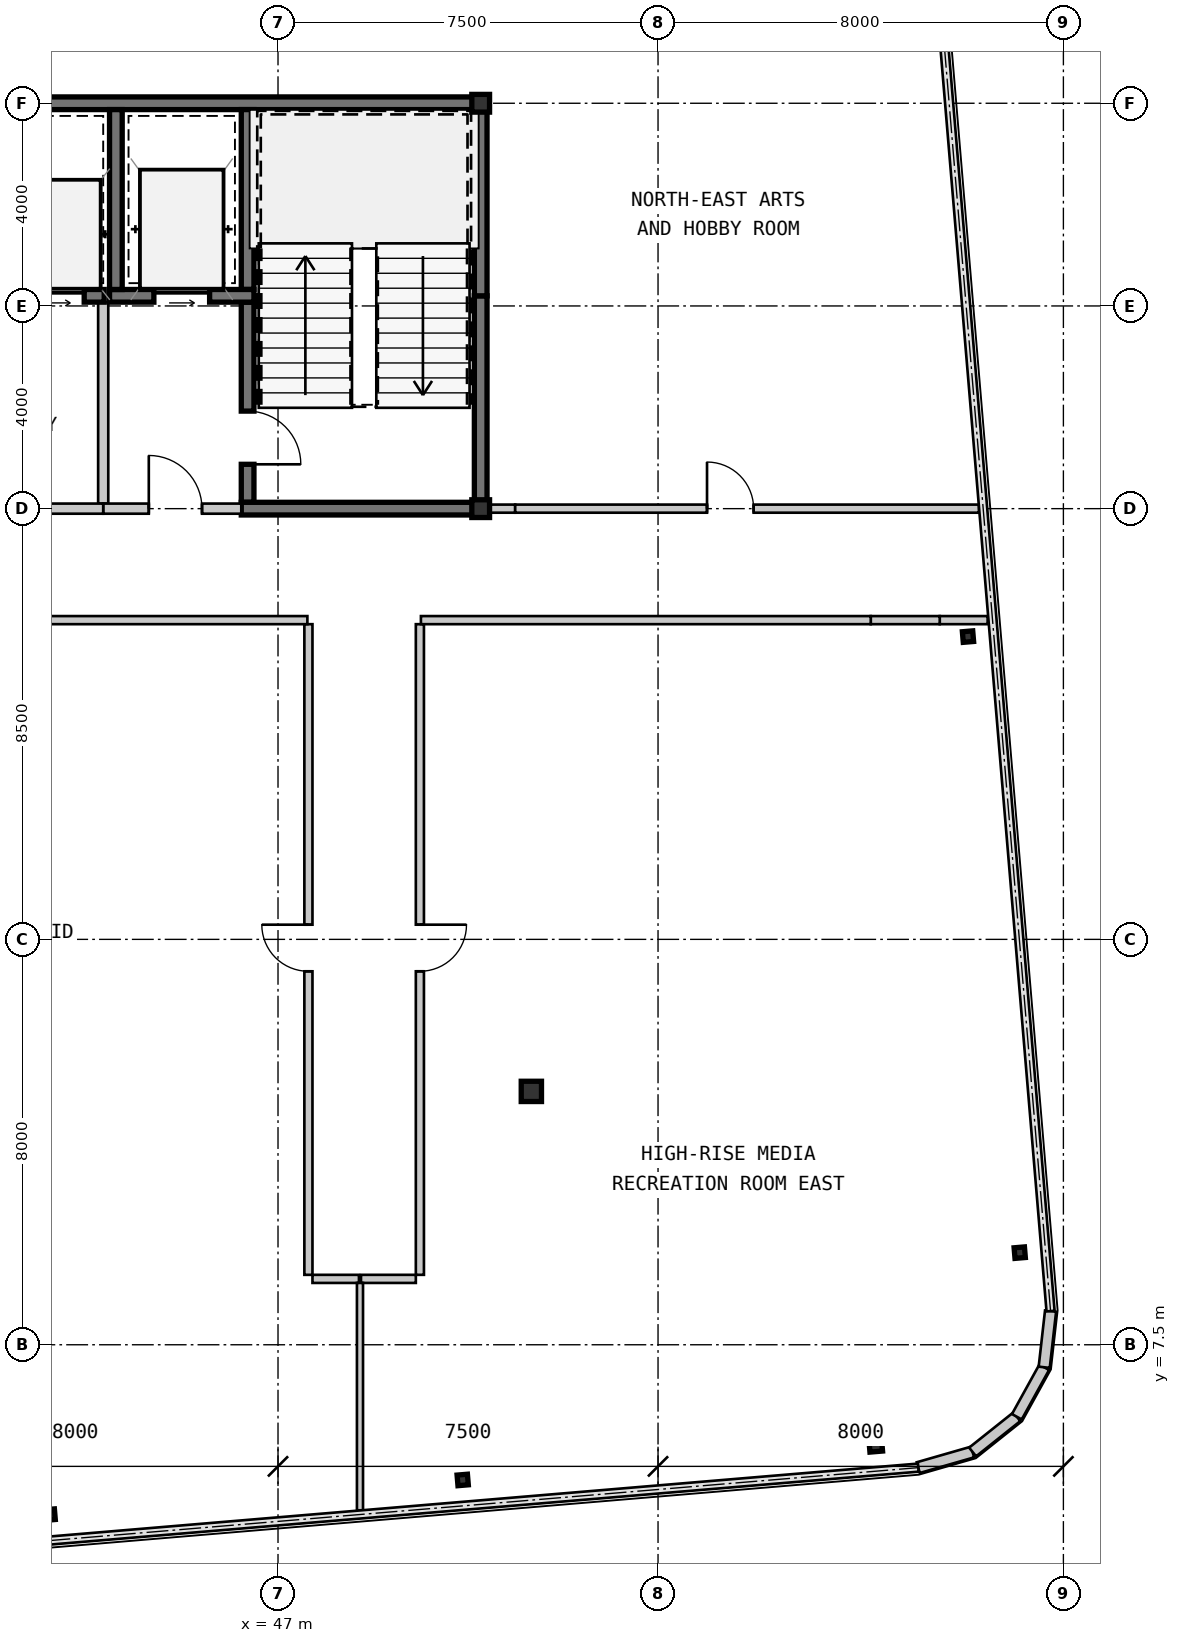
"""IFC4 building model, lengths in metres.
Left out: names, types, materials, properties, quantities, classifications, styles, units other than length and angle.
Written with IfcOpenShell. Run it as: python <this file> out.ifc"""

import sys

from ifc_helpers import new_model, si_unit, direction, frame, frame_2d, origin, origin_2d, place, context, subcontext, project, spatial, rectangle, hollow_rectangle, i_section, extrude, source, transform, mapped, element, fill, save


model = new_model("IFC4")
c1 = context("Model", 3, precision=1e-05, world=origin(), true_north=direction((0.0, 1.0)))
c2 = subcontext(c1, "Body", "Model", "MODEL_VIEW")
j1 = project(units=[si_unit("LENGTHUNIT", "METRE"), si_unit("PLANEANGLEUNIT", "RADIAN")], contexts=[c1])
p1 = place(None, origin())
s1 = spatial("IfcSite", under=j1, at=p1, CompositionType="ELEMENT")
p2 = place(p1, origin())
s2 = spatial("IfcBuilding", under=s1, at=p2, CompositionType="ELEMENT")
p3 = place(p2, frame((0.0, 0.0, 197.75)))
s3 = spatial("IfcBuildingStorey", under=s2, at=p3, CompositionType="ELEMENT", Elevation=197.75)
m1 = source(origin(), c2, "Body", "SweptSolid", [
    extrude(hollow_rectangle(XDim=0.35, YDim=0.35, WallThickness=0.016, at=origin_2d()), origin(), (0.0, 0.0, 1.0), 3.15),
])
for number, where, z_axis, x_axis in (
    (1, (51.0, 24.0, 0.0), (0.0, 0.0, 1.0), (1.0, 0.0, 0.0)),
    (2, (51.0, 32.0, 0.0), (0.0, 0.0, 1.0), (1.0, 0.0, 0.0)),
):
    element("IfcColumn", number, at=place(p3, frame(where, z_axis=z_axis, x_axis=x_axis)), inside=s3, PredefinedType="COLUMN", context=c2, shape_type="MappedRepresentation", body=[
        mapped(m1, transform((0.0, 0.0, 0.0), scale=1.0)),
    ])
m2 = source(origin(), c2, "Body", "SweptSolid", [
    extrude(hollow_rectangle(XDim=0.4, YDim=0.4, WallThickness=0.016, at=origin_2d()), origin(), (0.0, 0.0, 1.0), 3.15),
])
p4 = place(p3, frame((52.0, 12.5, 0.0), z_axis=(0.0, 0.0, 1.0), x_axis=(1.0, 0.0, 0.0)))
e3 = element("IfcColumn", 3, at=p4, inside=s3, PredefinedType="COLUMN", context=c2, shape_type="MappedRepresentation", body=[
    mapped(m2, transform((0.0, 0.0, 0.0), scale=1.0)),
])
m3 = source(origin(), c2, "Body", "SweptSolid", [
    extrude(i_section(OverallWidth=0.205, OverallDepth=0.21, WebThickness=0.009, FlangeThickness=0.014, at=origin_2d()), origin(), (0.0, 0.0, 1.0), 3.15),
])
for number, where, z_axis, x_axis in (
    (4, (42.494, 4.147, 0.0), (0.0, 0.0, 1.0), (0.996, 0.084, 0.0)),
    (5, (50.645, 4.832, 0.0), (0.0, 0.0, 1.0), (0.996, 0.084, 0.0)),
):
    element("IfcColumn", number, at=place(p3, frame(where, z_axis=z_axis, x_axis=x_axis)), inside=s3, PredefinedType="COLUMN", context=c2, shape_type="MappedRepresentation", body=[
        mapped(m3, transform((0.0, 0.0, 0.0), scale=1.0)),
    ])
m4 = source(origin(), c2, "Body", "SweptSolid", [
    extrude(hollow_rectangle(XDim=0.25, YDim=0.25, WallThickness=0.01, at=origin_2d()), origin(), (0.0, 0.0, 1.0), 3.15),
])
p5 = place(p3, frame((58.796, 5.516, 0.0), z_axis=(0.0, 0.0, 1.0), x_axis=(0.99649285925, 0.083677843332, 0.0)))
e6 = element("IfcColumn", 6, at=p5, inside=s3, PredefinedType="COLUMN", context=c2, shape_type="MappedRepresentation", body=[
    mapped(m4, transform((0.0, 0.0, 0.0), scale=1.0)),
])
for number, where, z_axis, x_axis in (
    (7, (61.638, 9.318, 0.0), (0.0, 0.0, 1.0), (0.996, 0.084, 0.0)),
    (8, (60.617, 21.475, 0.0), (0.0, 0.0, 1.0), (0.996, 0.084, 0.0)),
):
    element("IfcColumn", number, at=place(p3, frame(where, z_axis=z_axis, x_axis=x_axis)), inside=s3, PredefinedType="COLUMN", context=c2, shape_type="MappedRepresentation", body=[
        mapped(m3, transform((0.0, 0.0, 0.0), scale=1.0)),
    ])
m5 = source(origin(), c2, "Body", "SweptSolid", [
    extrude(rectangle(XDim=1.116, YDim=0.22, at=frame_2d((0.558, 0.0))), origin(), (0.0, 0.0, 1.0), 2.93),
])
for number, where, z_axis, x_axis in (
    (9, (59.636, 5.075, 0.0), (0.0, 0.0, 1.0), (0.961, 0.277, 0.0)),
    (10, (60.708, 5.384, 0.0), (0.0, 0.0, 1.0), (0.782, 0.623, 0.0)),
    (11, (61.581, 6.079, 0.0), (0.0, 0.0, 1.0), (0.484, 0.875, 0.0)),
    (12, (62.121, 7.056, 0.0), (0.0, 0.0, 1.0), (0.112, 0.994, 0.0)),
):
    element("IfcWall", number, at=place(p3, frame(where, z_axis=z_axis, x_axis=x_axis)), inside=s3, PredefinedType="SOLIDWALL", context=c2, shape_type="MappedRepresentation", body=[
        mapped(m5, transform((0.0, 0.0, 0.0), scale=1.0)),
    ])
m6 = source(origin(), c2, "Body", "SweptSolid", [
    extrude(rectangle(XDim=11.925, YDim=0.25, at=frame_2d((5.962, 0.0))), origin(), (0.0, 0.0, 1.0), 2.93),
])
p6 = place(p3, frame((39.2, 32.0, 0.0), z_axis=(0.0, 0.0, 1.0), x_axis=(1.0, 0.0, 0.0)))
e13 = element("IfcWall", 13, at=p6, inside=s3, PredefinedType="SHEAR", context=c2, shape_type="MappedRepresentation", body=[
    mapped(m6, transform((0.0, 0.0, 0.0), scale=1.0)),
])
m7 = source(origin(), c2, "Body", "SweptSolid", [
    extrude(rectangle(XDim=4.075, YDim=0.25, at=frame_2d((2.038, 0.0))), origin(), (0.0, 0.0, 1.0), 2.93),
])
p7 = place(p3, frame((51.0, 24.125, 0.0), z_axis=(0.0, 0.0, 1.0), x_axis=(0.0, 1.0, 0.0)))
e14 = element("IfcWall", 14, at=p7, inside=s3, PredefinedType="SHEAR", context=c2, shape_type="MappedRepresentation", body=[
    mapped(m7, transform((0.0, 0.0, 0.0), scale=1.0)),
])
m8 = source(origin(), c2, "Body", "SweptSolid", [
    extrude(rectangle(XDim=3.675, YDim=0.25, at=frame_2d((1.837, 0.0))), origin(), (0.0, 0.0, 1.0), 2.93),
])
p8 = place(p3, frame((51.0, 28.2, 0.0), z_axis=(0.0, 0.0, 1.0), x_axis=(0.0, 1.0, 0.0)))
e15 = element("IfcWall", 15, at=p8, inside=s3, PredefinedType="SHEAR", context=c2, shape_type="MappedRepresentation", body=[
    mapped(m8, transform((0.0, 0.0, 0.0), scale=1.0)),
])
m9 = source(origin(), c2, "Body", "SweptSolid", [
    extrude(rectangle(XDim=3.55, YDim=0.25, at=frame_2d((1.775, 0.0))), origin(), (0.0, 0.0, 1.0), 2.93),
])
p9 = place(p3, frame((46.4, 31.875, 0.0), z_axis=(0.0, 0.0, 1.0), x_axis=(0.0, -1.0, 0.0)))
e16 = element("IfcWall", 16, at=p9, inside=s3, PredefinedType="SHEAR", context=c2, shape_type="MappedRepresentation", body=[
    mapped(m9, transform((0.0, 0.0, 0.0), scale=1.0)),
])
m10 = source(origin(), c2, "Body", "SweptSolid", [
    extrude(rectangle(XDim=3.95, YDim=0.25, at=frame_2d((1.975, 0.0))), origin(), (0.0, 0.0, 1.0), 2.93),
])
p10 = place(p3, frame((46.4, 28.075, 0.0), z_axis=(0.0, 0.0, 1.0), x_axis=(0.0, -1.0, 0.0)))
e17 = element("IfcWall", 17, at=p10, inside=s3, PredefinedType="SHEAR", context=c2, shape_type="MappedRepresentation", body=[
    mapped(m10, transform((0.0, 0.0, 0.0), scale=1.0)),
])
m11 = source(origin(), c2, "Body", "SweptSolid", [
    extrude(rectangle(XDim=1.05, YDim=2.1, at=frame_2d((0.525, 1.05))), frame((0.0, 0.135, 0.0), z_axis=(0.0, -1.0, 0.0), x_axis=(1.0, 0.0, 0.0)), (0.0, 0.0, 1.0), 0.27),
])
p11 = place(p10, frame((2.15, 0.0, 0.0)))
e18 = element("IfcOpeningElement", 18, at=p11, cuts=e17, PredefinedType="OPENING", context=c2, shape_type="MappedRepresentation", body=[
    mapped(m11, transform((0.0, 0.0, 0.0), scale=1.0)),
])
m12 = source(origin(), c2, "Body", "SweptSolid", [
    extrude(rectangle(XDim=4.85, YDim=0.25, at=frame_2d((2.425, 0.0))), origin(), (0.0, 0.0, 1.0), 2.93),
])
p12 = place(p3, frame((46.275, 24.0, 0.0), z_axis=(0.0, 0.0, 1.0), x_axis=(1.0, 0.0, 0.0)))
e19 = element("IfcWall", 19, at=p12, inside=s3, PredefinedType="SHEAR", context=c2, shape_type="MappedRepresentation", body=[
    mapped(m12, transform((0.0, 0.0, 0.0), scale=1.0)),
])
m13 = source(origin(), c2, "Body", "SweptSolid", [
    extrude(rectangle(XDim=2.85, YDim=0.25, at=frame_2d((1.425, 0.0))), origin(), (0.0, 0.0, 1.0), 2.93),
])
p13 = place(p3, frame((43.675, 28.2, 0.0), z_axis=(0.0, 0.0, 1.0), x_axis=(1.0, 0.0, 0.0)))
e20 = element("IfcWall", 20, at=p13, inside=s3, PredefinedType="SHEAR", context=c2, shape_type="MappedRepresentation", body=[
    mapped(m13, transform((0.0, 0.0, 0.0), scale=1.0)),
])
m14 = source(origin(), c2, "Body", "SweptSolid", [
    extrude(rectangle(XDim=1.1, YDim=2.15, at=frame_2d((0.55, 1.075))), frame((0.0, 0.135, 0.0), z_axis=(0.0, -1.0, 0.0), x_axis=(1.0, 0.0, 0.0)), (0.0, 0.0, 1.0), 0.27),
])
p14 = place(p13, frame((0.875, 0.0, 0.0)))
e21 = element("IfcOpeningElement", 21, at=p14, cuts=e20, PredefinedType="OPENING", context=c2, shape_type="MappedRepresentation", body=[
    mapped(m14, transform((0.0, 0.0, 0.0), scale=1.0)),
])
p15 = place(p3, frame((43.8, 31.875, 0.0), z_axis=(0.0, 0.0, 1.0), x_axis=(0.0, -1.0, 0.0)))
e22 = element("IfcWall", 22, at=p15, inside=s3, PredefinedType="SHEAR", context=c2, shape_type="MappedRepresentation", body=[
    mapped(m9, transform((0.0, 0.0, 0.0), scale=1.0)),
])
m15 = source(origin(), c2, "Body", "SweptSolid", [
    extrude(rectangle(XDim=3.975, YDim=0.2, at=frame_2d((1.987, 0.0))), origin(), (0.0, 0.0, 1.0), 2.93),
])
p16 = place(p3, frame((43.55, 28.075, 0.0), z_axis=(0.0, 0.0, 1.0), x_axis=(0.0, -1.0, 0.0)))
e23 = element("IfcWall", 23, at=p16, inside=s3, PredefinedType="SOLIDWALL", context=c2, shape_type="MappedRepresentation", body=[
    mapped(m15, transform((0.0, 0.0, 0.0), scale=1.0)),
])
m16 = source(origin(), c2, "Body", "SweptSolid", [
    extrude(rectangle(XDim=2.725, YDim=0.2, at=frame_2d((1.362, 0.0))), origin(), (0.0, 0.0, 1.0), 2.397),
])
p17 = place(p3, frame((43.55, 24.0, 0.0), z_axis=(0.0, 0.0, 1.0), x_axis=(1.0, 0.0, 0.0)))
e24 = element("IfcWall", 24, at=p17, inside=s3, PredefinedType="SOLIDWALL", context=c2, shape_type="MappedRepresentation", body=[
    mapped(m16, transform((0.0, 0.0, 0.0), scale=1.0)),
])
m17 = source(origin(), c2, "Body", "SweptSolid", [
    extrude(rectangle(XDim=1.05, YDim=2.1, at=frame_2d((0.525, 1.05))), frame((0.0, 0.11, 0.0), z_axis=(0.0, -1.0, 0.0), x_axis=(1.0, 0.0, 0.0)), (0.0, 0.0, 1.0), 0.22),
])
p18 = place(p17, frame((0.9, 0.0, 0.0)))
e25 = element("IfcOpeningElement", 25, at=p18, cuts=e24, PredefinedType="OPENING", context=c2, shape_type="MappedRepresentation", body=[
    mapped(m17, transform((0.0, 0.0, 0.0), scale=1.0)),
])
m18 = source(origin(), c2, "Body", "SweptSolid", [
    extrude(rectangle(XDim=2.07, YDim=0.25, at=frame_2d((1.035, 0.0))), origin(), (0.0, 0.0, 1.0), 2.93),
])
p19 = place(p3, frame((41.5, 28.2, 0.0), z_axis=(0.0, 0.0, 1.0), x_axis=(1.0, 0.0, 0.0)))
e26 = element("IfcWall", 26, at=p19, inside=s3, PredefinedType="SHEAR", context=c2, shape_type="MappedRepresentation", body=[
    mapped(m18, transform((0.0, 0.0, 0.0), scale=1.0)),
])
m19 = source(origin(), c2, "Body", "SweptSolid", [
    extrude(rectangle(XDim=1.05, YDim=2.15, at=frame_2d((0.525, 1.075))), frame((0.0, 0.135, 0.0), z_axis=(0.0, -1.0, 0.0), x_axis=(1.0, 0.0, 0.0)), (0.0, 0.0, 1.0), 0.27),
])
p20 = place(p19, frame((0.625, 0.0, 0.0)))
e27 = element("IfcOpeningElement", 27, at=p20, cuts=e26, PredefinedType="OPENING", context=c2, shape_type="MappedRepresentation", body=[
    mapped(m19, transform((0.0, 0.0, 0.0), scale=1.0)),
])
m20 = source(origin(), c2, "Body", "SweptSolid", [
    extrude(rectangle(XDim=4.35, YDim=0.2, at=frame_2d((2.175, 0.0))), origin(), (0.0, 0.0, 1.0), 2.397),
])
p21 = place(p3, frame((43.55, 24.0, 0.0), z_axis=(0.0, 0.0, 1.0), x_axis=(-1.0, 0.0, 0.0)))
e28 = element("IfcWall", 28, at=p21, inside=s3, PredefinedType="SOLIDWALL", context=c2, shape_type="MappedRepresentation", body=[
    mapped(m20, transform((0.0, 0.0, 0.0), scale=1.0)),
])
p22 = place(p21, frame((1.65, 0.0, 0.0)))
e29 = element("IfcOpeningElement", 29, at=p22, cuts=e28, PredefinedType="OPENING", context=c2, shape_type="MappedRepresentation", body=[
    mapped(m17, transform((0.0, 0.0, 0.0), scale=1.0)),
])
m21 = source(origin(), c2, "Body", "SweptSolid", [
    extrude(rectangle(XDim=0.556, YDim=0.16, at=frame_2d((0.278, 0.0))), origin(), (0.0, 0.0, 1.0), 2.47),
])
p23 = place(p3, frame((51.125, 24.0, 0.0), z_axis=(0.0, 0.0, 1.0), x_axis=(1.0, 0.0, 0.0)))
e30 = element("IfcWall", 30, at=p23, inside=s3, PredefinedType="PARTITIONING", context=c2, shape_type="MappedRepresentation", body=[
    mapped(m21, transform((0.0, 0.0, 0.0), scale=1.0)),
])
m22 = source(origin(), c2, "Body", "SweptSolid", [
    extrude(rectangle(XDim=9.153, YDim=0.16, at=frame_2d((4.576, 0.0))), origin(), (0.0, 0.0, 1.0), 2.93),
])
p24 = place(p3, frame((51.681, 24.0, 0.0), z_axis=(0.0, 0.0, 1.0), x_axis=(1.0, 0.0, 0.0)))
e31 = element("IfcWall", 31, at=p24, inside=s3, PredefinedType="PARTITIONING", context=c2, shape_type="MappedRepresentation", body=[
    mapped(m22, transform((0.0, 0.0, 0.0), scale=1.0)),
])
m23 = source(origin(), c2, "Body", "SweptSolid", [
    extrude(rectangle(XDim=0.92, YDim=2.1, at=frame_2d((0.46, 1.05))), frame((0.0, 0.09, 0.0), z_axis=(0.0, -1.0, 0.0), x_axis=(1.0, 0.0, 0.0)), (0.0, 0.0, 1.0), 0.18),
])
p25 = place(p24, frame((3.786, 0.0, 0.0)))
e32 = element("IfcOpeningElement", 32, at=p25, cuts=e31, PredefinedType="OPENING", context=c2, shape_type="MappedRepresentation", body=[
    mapped(m23, transform((0.0, 0.0, 0.0), scale=1.0)),
])
m24 = source(origin(), c2, "Body", "SweptSolid", [
    extrude(rectangle(XDim=12.84, YDim=0.16, at=frame_2d((6.42, 0.0))), origin(), (0.0, 0.0, 1.0), 2.93),
])
p26 = place(p3, frame((47.6, 8.88, 0.0), z_axis=(0.0, 0.0, 1.0), x_axis=(0.0, 1.0, 0.0)))
e33 = element("IfcWall", 33, at=p26, inside=s3, PredefinedType="PARTITIONING", context=c2, shape_type="MappedRepresentation", body=[
    mapped(m24, transform((0.0, 0.0, 0.0), scale=1.0)),
])
p27 = place(p26, frame((5.99, 0.0, 0.0)))
e34 = element("IfcOpeningElement", 34, at=p27, cuts=e33, PredefinedType="OPENING", context=c2, shape_type="MappedRepresentation", body=[
    mapped(m23, transform((0.0, 0.0, 0.0), scale=1.0)),
])
m25 = source(origin(), c2, "Body", "SweptSolid", [
    extrude(rectangle(XDim=12.559, YDim=0.16, at=frame_2d((6.28, 0.0))), origin(), (0.0, 0.0, 1.0), 2.93),
])
p28 = place(p3, frame((47.58, 21.8, 0.0), z_axis=(0.0, 0.0, 1.0), x_axis=(-1.0, 0.0, 0.0)))
e35 = element("IfcWall", 35, at=p28, inside=s3, PredefinedType="PARTITIONING", context=c2, shape_type="MappedRepresentation", body=[
    mapped(m25, transform((0.0, 0.0, 0.0), scale=1.0)),
])
m26 = source(origin(), c2, "Body", "SweptSolid", [
    extrude(rectangle(XDim=0.917, YDim=0.16, at=frame_2d((0.459, 0.0))), origin(), (0.0, 0.0, 1.0), 2.93),
])
p29 = place(p3, frame((48.597, 8.8, 0.0), z_axis=(0.0, 0.0, 1.0), x_axis=(-1.0, 0.0, 0.0)))
e36 = element("IfcWall", 36, at=p29, inside=s3, PredefinedType="PARTITIONING", context=c2, shape_type="MappedRepresentation", body=[
    mapped(m26, transform((0.0, 0.0, 0.0), scale=1.0)),
])
p30 = place(p3, frame((49.8, 21.72, 0.0), z_axis=(0.0, 0.0, 1.0), x_axis=(0.0, -1.0, 0.0)))
e37 = element("IfcWall", 37, at=p30, inside=s3, PredefinedType="PARTITIONING", context=c2, shape_type="MappedRepresentation", body=[
    mapped(m24, transform((0.0, 0.0, 0.0), scale=1.0)),
])
p31 = place(p30, frame((5.93, 0.0, 0.0)))
e38 = element("IfcOpeningElement", 38, at=p31, cuts=e37, PredefinedType="OPENING", context=c2, shape_type="MappedRepresentation", body=[
    mapped(m23, transform((0.0, 0.0, 0.0), scale=1.0)),
])
m27 = source(origin(), c2, "Body", "SweptSolid", [
    extrude(rectangle(XDim=0.945, YDim=0.16, at=frame_2d((0.473, 0.0))), origin(), (0.0, 0.0, 1.0), 2.93),
])
p32 = place(p3, frame((61.005, 21.8, 0.0), z_axis=(0.0, 0.0, 1.0), x_axis=(-1.0, 0.0, 0.0)))
e39 = element("IfcWall", 39, at=p32, inside=s3, PredefinedType="PARTITIONING", context=c2, shape_type="MappedRepresentation", body=[
    mapped(m27, transform((0.0, 0.0, 0.0), scale=1.0)),
])
m28 = source(origin(), c2, "Body", "SweptSolid", [
    extrude(rectangle(XDim=1.361, YDim=0.16, at=frame_2d((0.681, 0.0))), origin(), (0.0, 0.0, 1.0), 2.47),
])
p33 = place(p3, frame((60.059, 21.8, 0.0), z_axis=(0.0, 0.0, 1.0), x_axis=(-1.0, 0.0, 0.0)))
e40 = element("IfcWall", 40, at=p33, inside=s3, PredefinedType="PARTITIONING", context=c2, shape_type="MappedRepresentation", body=[
    mapped(m28, transform((0.0, 0.0, 0.0), scale=1.0)),
])
m29 = source(origin(), c2, "Body", "SweptSolid", [
    extrude(rectangle(XDim=8.878, YDim=0.16, at=frame_2d((4.439, 0.0))), origin(), (0.0, 0.0, 1.0), 2.93),
])
p34 = place(p3, frame((58.698, 21.8, 0.0), z_axis=(0.0, 0.0, 1.0), x_axis=(-1.0, 0.0, 0.0)))
e41 = element("IfcWall", 41, at=p34, inside=s3, PredefinedType="PARTITIONING", context=c2, shape_type="MappedRepresentation", body=[
    mapped(m29, transform((0.0, 0.0, 0.0), scale=1.0)),
])
m30 = source(origin(), c2, "Body", "SweptSolid", [
    extrude(rectangle(XDim=1.082, YDim=0.16, at=frame_2d((0.541, 0.0))), origin(), (0.0, 0.0, 1.0), 2.93),
])
p35 = place(p3, frame((49.72, 8.8, 0.0), z_axis=(0.0, 0.0, 1.0), x_axis=(-1.0, 0.0, 0.0)))
e42 = element("IfcWall", 42, at=p35, inside=s3, PredefinedType="PARTITIONING", context=c2, shape_type="MappedRepresentation", body=[
    mapped(m30, transform((0.0, 0.0, 0.0), scale=1.0)),
])
m31 = source(origin(), c2, "Body", "SweptSolid", [
    extrude(rectangle(XDim=4.487, YDim=0.12, at=frame_2d((2.243, 0.0))), origin(), (0.0, 0.0, 1.0), 2.93),
])
p36 = place(p3, frame((48.618, 8.72, 0.0), z_axis=(0.0, 0.0, 1.0), x_axis=(0.0, -1.0, 0.0)))
e43 = element("IfcWall", 43, at=p36, inside=s3, PredefinedType="PARTITIONING", context=c2, shape_type="MappedRepresentation", body=[
    mapped(m31, transform((0.0, 0.0, 0.0), scale=1.0)),
])
m32 = source(origin(), c2, "Body", "SweptSolid", [
    extrude(rectangle(XDim=1.05, YDim=2.1, at=frame_2d((0.525, 1.05))), frame((0.0, 0.025, 0.0), z_axis=(0.0, -1.0, 0.0), x_axis=(1.0, 0.0, 0.0)), (0.0, 0.0, 1.0), 0.05),
])
p37 = place(p11, origin())
e44 = element("IfcDoor", 44, at=p37, inside=s3, OperationType="SINGLE_SWING_RIGHT", PredefinedType="DOOR", context=c2, shape_type="MappedRepresentation", body=[
    mapped(m32, transform((0.0, 0.0, 0.0), scale=1.0)),
])
fill(e18, e44)
m33 = source(origin(), c2, "Body", "SweptSolid", [
    extrude(rectangle(XDim=1.1, YDim=2.15, at=frame_2d((0.55, 1.075))), frame((0.0, 0.025, 0.0), z_axis=(0.0, -1.0, 0.0), x_axis=(1.0, 0.0, 0.0)), (0.0, 0.0, 1.0), 0.05),
])
p38 = place(p14, origin())
e45 = element("IfcDoor", 45, at=p38, inside=s3, OperationType="SLIDING_TO_LEFT", PredefinedType="DOOR", context=c2, shape_type="MappedRepresentation", body=[
    mapped(m33, transform((0.0, 0.0, 0.0), scale=1.0)),
])
fill(e21, e45)
p39 = place(p18, origin())
e46 = element("IfcDoor", 46, at=p39, inside=s3, OperationType="SINGLE_SWING_LEFT", PredefinedType="DOOR", context=c2, shape_type="MappedRepresentation", body=[
    mapped(m32, transform((0.0, 0.0, 0.0), scale=1.0)),
])
fill(e25, e46)
m34 = source(origin(), c2, "Body", "SweptSolid", [
    extrude(rectangle(XDim=1.05, YDim=2.15, at=frame_2d((0.525, 1.075))), frame((0.0, 0.025, 0.0), z_axis=(0.0, -1.0, 0.0), x_axis=(1.0, 0.0, 0.0)), (0.0, 0.0, 1.0), 0.05),
])
p40 = place(p20, origin())
e47 = element("IfcDoor", 47, at=p40, inside=s3, OperationType="SLIDING_TO_LEFT", PredefinedType="DOOR", context=c2, shape_type="MappedRepresentation", body=[
    mapped(m34, transform((0.0, 0.0, 0.0), scale=1.0)),
])
fill(e27, e47)
m35 = source(origin(), c2, "Body", "SweptSolid", [
    extrude(rectangle(XDim=0.92, YDim=2.1, at=frame_2d((0.46, 1.05))), frame((0.0, 0.025, 0.0), z_axis=(0.0, -1.0, 0.0), x_axis=(1.0, 0.0, 0.0)), (0.0, 0.0, 1.0), 0.05),
])
p41 = place(p25, origin())
e48 = element("IfcDoor", 48, at=p41, inside=s3, OperationType="SINGLE_SWING_LEFT", PredefinedType="DOOR", context=c2, shape_type="MappedRepresentation", body=[
    mapped(m35, transform((0.0, 0.0, 0.0), scale=1.0)),
])
fill(e32, e48)
p42 = place(p27, origin())
e49 = element("IfcDoor", 49, at=p42, inside=s3, OperationType="SINGLE_SWING_RIGHT", PredefinedType="DOOR", context=c2, shape_type="MappedRepresentation", body=[
    mapped(m35, transform((0.0, 0.0, 0.0), scale=1.0)),
])
fill(e34, e49)
p43 = place(p31, origin())
e50 = element("IfcDoor", 50, at=p43, inside=s3, OperationType="SINGLE_SWING_LEFT", PredefinedType="DOOR", context=c2, shape_type="MappedRepresentation", body=[
    mapped(m35, transform((0.0, 0.0, 0.0), scale=1.0)),
])
fill(e38, e50)
save(model, sys.argv[1])
